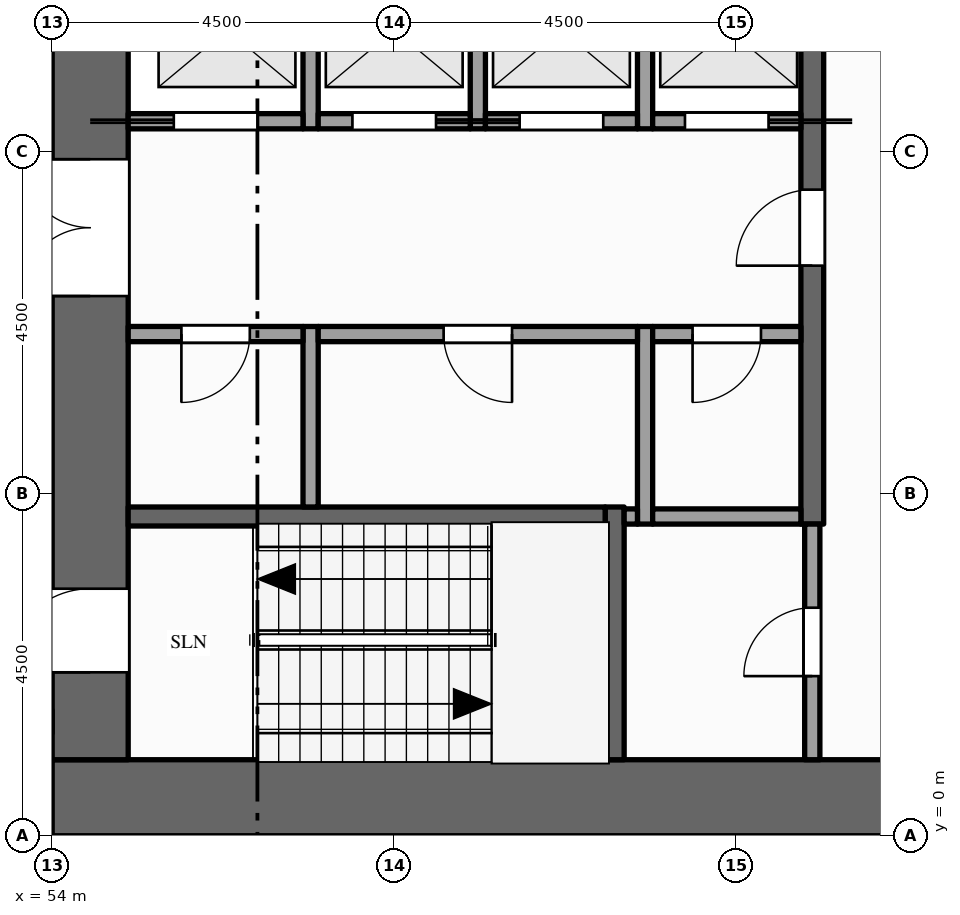
"""IFC4 building model, lengths in metres.
Left out: names, types, materials, properties, quantities, classifications, styles, units other than length and angle.
Written with IfcOpenShell. Run it as: python <this file> out.ifc"""

import sys

from ifc_helpers import new_model, si_unit, direction, frame, frame_2d, origin, place, context, subcontext, project, spatial, rectangle, extrude, element, fill, save


model = new_model("IFC4")
c1 = context("Model", 3, precision=1e-05, world=origin(), true_north=direction((0.0, 1.0)))
c2 = subcontext(c1, "Body", "Model", "MODEL_VIEW")
j1 = project(units=[si_unit("LENGTHUNIT", "METRE"), si_unit("PLANEANGLEUNIT", "RADIAN")], contexts=[c1])
p1 = place(None, origin())
s1 = spatial("IfcSite", under=j1, at=p1, CompositionType="ELEMENT")
p2 = place(p1, origin())
s2 = spatial("IfcBuilding", under=s1, at=p2, CompositionType="ELEMENT")
p3 = place(p2, frame((0.0, 0.0, 159.0)))
s3 = spatial("IfcBuildingStorey", under=s2, at=p3, CompositionType="ELEMENT", Elevation=159.0)
p4 = place(p3, frame((67.5, 0.5, -0.15), z_axis=(0.0, 0.0, 1.0), x_axis=(-1.0, 0.0, 0.0)))
e1 = element("IfcWall", 1, at=p4, inside=s3, PredefinedType="SHEAR", context=c2, shape_type="SweptSolid", body=[
    extrude(rectangle(XDim=13.5, YDim=1.0, at=frame_2d((6.75, 0.0))), origin(), (0.0, 0.0, 1.0), 4.0),
])
p5 = place(p3, frame((54.5, 1.0, -0.15), z_axis=(0.0, 0.0, 1.0), x_axis=(0.0, 1.0, 0.0)))
e2 = element("IfcWall", 2, at=p5, inside=s3, PredefinedType="SHEAR", context=c2, shape_type="SweptSolid", body=[
    extrude(rectangle(XDim=20.5, YDim=1.0, at=frame_2d((10.25, 0.0))), origin(), (0.0, 0.0, 1.0), 4.0),
])
p6 = place(p5, frame((6.1, 0.0, 0.15)))
e3 = element("IfcOpeningElement", 3, at=p6, cuts=e2, PredefinedType="OPENING", context=c2, shape_type="SweptSolid", body=[
    extrude(rectangle(XDim=1.8, YDim=2.1, at=frame_2d((0.9, 1.05))), frame((0.0, 0.51, 0.0), z_axis=(0.0, -1.0, 0.0), x_axis=(1.0, 0.0, 0.0)), (0.0, 0.0, 1.0), 1.02),
])
p7 = place(p5, frame((12.15, 0.0, 0.15)))
e4 = element("IfcOpeningElement", 4, at=p7, cuts=e2, PredefinedType="OPENING", context=c2, shape_type="SweptSolid", body=[
    extrude(rectangle(XDim=1.1, YDim=2.1, at=frame_2d((0.55, 1.05))), frame((0.0, 0.51, 0.0), z_axis=(0.0, -1.0, 0.0), x_axis=(1.0, 0.0, 0.0)), (0.0, 0.0, 1.0), 1.02),
])
p8 = place(p5, frame((1.15, 0.0, 0.15)))
e5 = element("IfcOpeningElement", 5, at=p8, cuts=e2, PredefinedType="OPENING", context=c2, shape_type="SweptSolid", body=[
    extrude(rectangle(XDim=1.1, YDim=2.1, at=frame_2d((0.55, 1.05))), frame((0.0, 0.51, 0.0), z_axis=(0.0, -1.0, 0.0), x_axis=(1.0, 0.0, 0.0)), (0.0, 0.0, 1.0), 1.02),
])
p9 = place(p5, frame((18.35, 0.0, 0.15)))
e6 = element("IfcOpeningElement", 6, at=p9, cuts=e2, PredefinedType="OPENING", context=c2, shape_type="SweptSolid", body=[
    extrude(rectangle(XDim=1.1, YDim=2.1, at=frame_2d((0.55, 1.05))), frame((0.0, 0.51, 0.0), z_axis=(0.0, -1.0, 0.0), x_axis=(1.0, 0.0, 0.0)), (0.0, 0.0, 1.0), 1.02),
])
p10 = place(p3, frame((57.4, 4.325, 0.0), z_axis=(0.0, 0.0, 1.0), x_axis=(0.0, 1.0, 0.0)))
e7 = element("IfcWall", 7, at=p10, inside=s3, PredefinedType="PARTITIONING", context=c2, shape_type="SweptSolid", body=[
    extrude(rectangle(XDim=2.375, YDim=0.2, at=frame_2d((1.188, 0.0))), origin(), (0.0, 0.0, 1.0), 3.85),
])
for number, where, z_axis, x_axis in (
    (8, (57.4, 9.3, 0.0), (0.0, 0.0, 1.0), (0.0, 1.0, 0.0)),
    (9, (59.6, 9.3, 0.0), (0.0, 0.0, 1.0), (0.0, 1.0, 0.0)),
):
    element("IfcWall", number, at=place(p3, frame(where, z_axis=z_axis, x_axis=x_axis)), inside=s3, PredefinedType="SOLIDWALL", context=c2, shape_type="SweptSolid", body=[
        extrude(rectangle(XDim=2.6, YDim=0.2, at=frame_2d((1.3, 0.0))), origin(), (0.0, 0.0, 1.0), 3.85),
    ])
p11 = place(p3, frame((61.4, 1.0, 0.0), z_axis=(0.0, 0.0, 1.0), x_axis=(0.0, 1.0, 0.0)))
e10 = element("IfcWall", 10, at=p11, inside=s3, PredefinedType="SHEAR", context=c2, shape_type="SweptSolid", body=[
    extrude(rectangle(XDim=3.325, YDim=0.25, at=frame_2d((1.663, 0.0))), origin(), (0.0, 0.0, 1.0), 3.85),
])
p12 = place(p3, frame((61.8, 4.1, 0.0), z_axis=(0.0, 0.0, 1.0), x_axis=(0.0, 1.0, 0.0)))
e11 = element("IfcWall", 11, at=p12, inside=s3, PredefinedType="PARTITIONING", context=c2, shape_type="SweptSolid", body=[
    extrude(rectangle(XDim=2.6, YDim=0.2, at=frame_2d((1.3, 0.0))), origin(), (0.0, 0.0, 1.0), 3.85),
])
p13 = place(p3, frame((61.8, 9.3, 0.0), z_axis=(0.0, 0.0, 1.0), x_axis=(0.0, 1.0, 0.0)))
e12 = element("IfcWall", 12, at=p13, inside=s3, PredefinedType="SOLIDWALL", context=c2, shape_type="SweptSolid", body=[
    extrude(rectangle(XDim=2.6, YDim=0.2, at=frame_2d((1.3, 0.0))), origin(), (0.0, 0.0, 1.0), 3.85),
])
p14 = place(p3, frame((64.0, 1.0, 0.0), z_axis=(0.0, 0.0, 1.0), x_axis=(0.0, 1.0, 0.0)))
e13 = element("IfcWall", 13, at=p14, inside=s3, PredefinedType="PARTITIONING", context=c2, shape_type="SweptSolid", body=[
    extrude(rectangle(XDim=3.1, YDim=0.2, at=frame_2d((1.55, 0.0))), origin(), (0.0, 0.0, 1.0), 3.85),
])
p15 = place(p14, frame((1.1, 0.0, 0.0)))
e14 = element("IfcOpeningElement", 14, at=p15, cuts=e13, PredefinedType="OPENING", context=c2, shape_type="SweptSolid", body=[
    extrude(rectangle(XDim=0.9, YDim=2.1, at=frame_2d((0.45, 1.05))), frame((0.0, 0.11, 0.0), z_axis=(0.0, -1.0, 0.0), x_axis=(1.0, 0.0, 0.0)), (0.0, 0.0, 1.0), 0.22),
])
p16 = place(p3, frame((64.0, 4.1, 0.0), z_axis=(0.0, 0.0, 1.0), x_axis=(0.0, 1.0, 0.0)))
e15 = element("IfcWall", 15, at=p16, inside=s3, PredefinedType="SHEAR", context=c2, shape_type="SweptSolid", body=[
    extrude(rectangle(XDim=14.5, YDim=0.3, at=frame_2d((7.25, 0.0))), origin(), (0.0, 0.0, 1.0), 3.85),
])
p17 = place(p16, frame((3.4, 0.0, 0.0)))
e16 = element("IfcOpeningElement", 16, at=p17, cuts=e15, PredefinedType="OPENING", context=c2, shape_type="SweptSolid", body=[
    extrude(rectangle(XDim=1.0, YDim=2.1, at=frame_2d((0.5, 1.05))), frame((0.0, 0.16, 0.0), z_axis=(0.0, -1.0, 0.0), x_axis=(1.0, 0.0, 0.0)), (0.0, 0.0, 1.0), 0.32),
])
p18 = place(p16, frame((9.1, 0.0, 0.0)))
e17 = element("IfcOpeningElement", 17, at=p18, cuts=e15, PredefinedType="OPENING", context=c2, shape_type="SweptSolid", body=[
    extrude(rectangle(XDim=1.0, YDim=2.1, at=frame_2d((0.5, 1.05))), frame((0.0, 0.16, 0.0), z_axis=(0.0, -1.0, 0.0), x_axis=(1.0, 0.0, 0.0)), (0.0, 0.0, 1.0), 0.32),
])
p19 = place(p3, frame((55.0, 4.2, 0.0), z_axis=(0.0, 0.0, 1.0), x_axis=(1.0, 0.0, 0.0)))
e18 = element("IfcWall", 18, at=p19, inside=s3, PredefinedType="SHEAR", context=c2, shape_type="SweptSolid", body=[
    extrude(rectangle(XDim=6.275, YDim=0.25, at=frame_2d((3.137, 0.0))), origin(), (0.0, 0.0, 1.0), 3.85),
])
p20 = place(p3, frame((61.525, 4.2, 0.0), z_axis=(0.0, 0.0, 1.0), x_axis=(1.0, 0.0, 0.0)))
e19 = element("IfcWall", 19, at=p20, inside=s3, PredefinedType="PARTITIONING", context=c2, shape_type="SweptSolid", body=[
    extrude(rectangle(XDim=0.175, YDim=0.2, at=frame_2d((0.087, 0.0))), origin(), (0.0, 0.0, 1.0), 3.85),
])
p21 = place(p3, frame((61.9, 4.2, 0.0), z_axis=(0.0, 0.0, 1.0), x_axis=(1.0, 0.0, 0.0)))
e20 = element("IfcWall", 20, at=p21, inside=s3, PredefinedType="PARTITIONING", context=c2, shape_type="SweptSolid", body=[
    extrude(rectangle(XDim=1.95, YDim=0.2, at=frame_2d((0.975, 0.0))), origin(), (0.0, 0.0, 1.0), 3.85),
])
p22 = place(p3, frame((55.0, 6.6, 0.0), z_axis=(0.0, 0.0, 1.0), x_axis=(1.0, 0.0, 0.0)))
e21 = element("IfcWall", 21, at=p22, inside=s3, PredefinedType="PARTITIONING", context=c2, shape_type="SweptSolid", body=[
    extrude(rectangle(XDim=2.3, YDim=0.2, at=frame_2d((1.15, 0.0))), origin(), (0.0, 0.0, 1.0), 3.85),
])
p23 = place(p22, frame((0.7, 0.0, 0.0)))
e22 = element("IfcOpeningElement", 22, at=p23, cuts=e21, PredefinedType="OPENING", context=c2, shape_type="SweptSolid", body=[
    extrude(rectangle(XDim=0.9, YDim=2.1, at=frame_2d((0.45, 1.05))), frame((0.0, 0.11, 0.0), z_axis=(0.0, -1.0, 0.0), x_axis=(1.0, 0.0, 0.0)), (0.0, 0.0, 1.0), 0.22),
])
p24 = place(p3, frame((57.5, 6.6, 0.0), z_axis=(0.0, 0.0, 1.0), x_axis=(1.0, 0.0, 0.0)))
e23 = element("IfcWall", 23, at=p24, inside=s3, PredefinedType="PARTITIONING", context=c2, shape_type="SweptSolid", body=[
    extrude(rectangle(XDim=4.2, YDim=0.2, at=frame_2d((2.1, 0.0))), origin(), (0.0, 0.0, 1.0), 3.85),
])
p25 = place(p24, frame((1.65, 0.0, 0.0)))
e24 = element("IfcOpeningElement", 24, at=p25, cuts=e23, PredefinedType="OPENING", context=c2, shape_type="SweptSolid", body=[
    extrude(rectangle(XDim=0.9, YDim=2.1, at=frame_2d((0.45, 1.05))), frame((0.0, 0.11, 0.0), z_axis=(0.0, -1.0, 0.0), x_axis=(1.0, 0.0, 0.0)), (0.0, 0.0, 1.0), 0.22),
])
p26 = place(p3, frame((61.9, 6.6, 0.0), z_axis=(0.0, 0.0, 1.0), x_axis=(1.0, 0.0, 0.0)))
e25 = element("IfcWall", 25, at=p26, inside=s3, PredefinedType="PARTITIONING", context=c2, shape_type="SweptSolid", body=[
    extrude(rectangle(XDim=1.95, YDim=0.2, at=frame_2d((0.975, 0.0))), origin(), (0.0, 0.0, 1.0), 3.85),
])
p27 = place(p26, frame((0.525, 0.0, 0.0)))
e26 = element("IfcOpeningElement", 26, at=p27, cuts=e25, PredefinedType="OPENING", context=c2, shape_type="SweptSolid", body=[
    extrude(rectangle(XDim=0.9, YDim=2.1, at=frame_2d((0.45, 1.05))), frame((0.0, 0.11, 0.0), z_axis=(0.0, -1.0, 0.0), x_axis=(1.0, 0.0, 0.0)), (0.0, 0.0, 1.0), 0.22),
])
p28 = place(p3, frame((55.0, 9.4, 0.0), z_axis=(0.0, 0.0, 1.0), x_axis=(1.0, 0.0, 0.0)))
e27 = element("IfcWall", 27, at=p28, inside=s3, PredefinedType="SOLIDWALL", context=c2, shape_type="SweptSolid", body=[
    extrude(rectangle(XDim=2.3, YDim=0.2, at=frame_2d((1.15, 0.0))), origin(), (0.0, 0.0, 1.0), 3.85),
])
p29 = place(p28, frame((0.6, 0.0, 0.012)))
e28 = element("IfcOpeningElement", 28, at=p29, cuts=e27, PredefinedType="OPENING", context=c2, shape_type="SweptSolid", body=[
    extrude(rectangle(XDim=1.1, YDim=2.1, at=frame_2d((0.55, 1.05))), frame((0.0, 0.11, 0.0), z_axis=(0.0, -1.0, 0.0), x_axis=(1.0, 0.0, 0.0)), (0.0, 0.0, 1.0), 0.22),
])
p30 = place(p3, frame((57.5, 9.4, 0.0), z_axis=(0.0, 0.0, 1.0), x_axis=(1.0, 0.0, 0.0)))
e29 = element("IfcWall", 29, at=p30, inside=s3, PredefinedType="SOLIDWALL", context=c2, shape_type="SweptSolid", body=[
    extrude(rectangle(XDim=2.0, YDim=0.2, at=frame_2d((1.0, 0.0))), origin(), (0.0, 0.0, 1.0), 3.85),
])
p31 = place(p30, frame((0.45, 0.0, 0.012)))
e30 = element("IfcOpeningElement", 30, at=p31, cuts=e29, PredefinedType="OPENING", context=c2, shape_type="SweptSolid", body=[
    extrude(rectangle(XDim=1.1, YDim=2.1, at=frame_2d((0.55, 1.05))), frame((0.0, 0.11, 0.0), z_axis=(0.0, -1.0, 0.0), x_axis=(1.0, 0.0, 0.0)), (0.0, 0.0, 1.0), 0.22),
])
p32 = place(p3, frame((59.7, 9.4, 0.0), z_axis=(0.0, 0.0, 1.0), x_axis=(1.0, 0.0, 0.0)))
e31 = element("IfcWall", 31, at=p32, inside=s3, PredefinedType="SOLIDWALL", context=c2, shape_type="SweptSolid", body=[
    extrude(rectangle(XDim=2.0, YDim=0.2, at=frame_2d((1.0, 0.0))), origin(), (0.0, 0.0, 1.0), 3.85),
])
p33 = place(p32, frame((0.45, 0.0, 0.012)))
e32 = element("IfcOpeningElement", 32, at=p33, cuts=e31, PredefinedType="OPENING", context=c2, shape_type="SweptSolid", body=[
    extrude(rectangle(XDim=1.1, YDim=2.1, at=frame_2d((0.55, 1.05))), frame((0.0, 0.11, 0.0), z_axis=(0.0, -1.0, 0.0), x_axis=(1.0, 0.0, 0.0)), (0.0, 0.0, 1.0), 0.22),
])
p34 = place(p3, frame((61.9, 9.4, 0.0), z_axis=(0.0, 0.0, 1.0), x_axis=(1.0, 0.0, 0.0)))
e33 = element("IfcWall", 33, at=p34, inside=s3, PredefinedType="SOLIDWALL", context=c2, shape_type="SweptSolid", body=[
    extrude(rectangle(XDim=1.95, YDim=0.2, at=frame_2d((0.975, 0.0))), origin(), (0.0, 0.0, 1.0), 3.85),
])
p35 = place(p34, frame((0.425, 0.0, 0.012)))
e34 = element("IfcOpeningElement", 34, at=p35, cuts=e33, PredefinedType="OPENING", context=c2, shape_type="SweptSolid", body=[
    extrude(rectangle(XDim=1.1, YDim=2.1, at=frame_2d((0.55, 1.05))), frame((0.0, 0.11, 0.0), z_axis=(0.0, -1.0, 0.0), x_axis=(1.0, 0.0, 0.0)), (0.0, 0.0, 1.0), 0.22),
])
p36 = place(p29, origin())
e35 = element("IfcDoor", 35, at=p36, inside=s3, OperationType="SLIDING_TO_LEFT", PredefinedType="DOOR", context=c2, shape_type="SweptSolid", body=[
    extrude(rectangle(XDim=1.1, YDim=2.1, at=frame_2d((0.55, 1.05))), frame((0.0, 0.025, 0.0), z_axis=(0.0, -1.0, 0.0), x_axis=(1.0, 0.0, 0.0)), (0.0, 0.0, 1.0), 0.05),
])
fill(e28, e35)
p37 = place(p31, origin())
e36 = element("IfcDoor", 36, at=p37, inside=s3, OperationType="SLIDING_TO_RIGHT", PredefinedType="DOOR", context=c2, shape_type="SweptSolid", body=[
    extrude(rectangle(XDim=1.1, YDim=2.1, at=frame_2d((0.55, 1.05))), frame((0.0, 0.025, 0.0), z_axis=(0.0, -1.0, 0.0), x_axis=(1.0, 0.0, 0.0)), (0.0, 0.0, 1.0), 0.05),
])
fill(e30, e36)
p38 = place(p33, origin())
e37 = element("IfcDoor", 37, at=p38, inside=s3, OperationType="SLIDING_TO_LEFT", PredefinedType="DOOR", context=c2, shape_type="SweptSolid", body=[
    extrude(rectangle(XDim=1.1, YDim=2.1, at=frame_2d((0.55, 1.05))), frame((0.0, 0.025, 0.0), z_axis=(0.0, -1.0, 0.0), x_axis=(1.0, 0.0, 0.0)), (0.0, 0.0, 1.0), 0.05),
])
fill(e32, e37)
p39 = place(p35, origin())
e38 = element("IfcDoor", 38, at=p39, inside=s3, OperationType="SLIDING_TO_RIGHT", PredefinedType="DOOR", context=c2, shape_type="SweptSolid", body=[
    extrude(rectangle(XDim=1.1, YDim=2.1, at=frame_2d((0.55, 1.05))), frame((0.0, 0.025, 0.0), z_axis=(0.0, -1.0, 0.0), x_axis=(1.0, 0.0, 0.0)), (0.0, 0.0, 1.0), 0.05),
])
fill(e34, e38)
p40 = place(p6, origin())
e39 = element("IfcDoor", 39, at=p40, inside=s3, OperationType="DOUBLE_DOOR_SINGLE_SWING", PredefinedType="DOOR", context=c2, shape_type="SweptSolid", body=[
    extrude(rectangle(XDim=1.8, YDim=2.1, at=frame_2d((0.9, 1.05))), frame((0.0, 0.025, 0.0), z_axis=(0.0, -1.0, 0.0), x_axis=(1.0, 0.0, 0.0)), (0.0, 0.0, 1.0), 0.05),
])
fill(e3, e39)
p41 = place(p17, origin())
e40 = element("IfcDoor", 40, at=p41, inside=s3, OperationType="SINGLE_SWING_LEFT", PredefinedType="DOOR", context=c2, shape_type="SweptSolid", body=[
    extrude(rectangle(XDim=1.0, YDim=2.1, at=frame_2d((0.5, 1.05))), frame((0.0, 0.025, 0.0), z_axis=(0.0, -1.0, 0.0), x_axis=(1.0, 0.0, 0.0)), (0.0, 0.0, 1.0), 0.05),
])
fill(e16, e40)
p42 = place(p8, origin())
e41 = element("IfcDoor", 41, at=p42, inside=s3, OperationType="SINGLE_SWING_LEFT", PredefinedType="DOOR", context=c2, shape_type="SweptSolid", body=[
    extrude(rectangle(XDim=1.1, YDim=2.1, at=frame_2d((0.55, 1.05))), frame((0.0, 0.025, 0.0), z_axis=(0.0, -1.0, 0.0), x_axis=(1.0, 0.0, 0.0)), (0.0, 0.0, 1.0), 0.05),
])
fill(e5, e41)
p43 = place(p15, origin())
e42 = element("IfcDoor", 42, at=p43, inside=s3, OperationType="SINGLE_SWING_LEFT", PredefinedType="DOOR", context=c2, shape_type="SweptSolid", body=[
    extrude(rectangle(XDim=0.9, YDim=2.1, at=frame_2d((0.45, 1.05))), frame((0.0, 0.025, 0.0), z_axis=(0.0, -1.0, 0.0), x_axis=(1.0, 0.0, 0.0)), (0.0, 0.0, 1.0), 0.05),
])
fill(e14, e42)
p44 = place(p23, origin())
e43 = element("IfcDoor", 43, at=p44, inside=s3, OperationType="SINGLE_SWING_LEFT", PredefinedType="DOOR", context=c2, shape_type="SweptSolid", body=[
    extrude(rectangle(XDim=0.9, YDim=2.1, at=frame_2d((0.45, 1.05))), frame((0.0, 0.025, 0.0), z_axis=(0.0, -1.0, 0.0), x_axis=(1.0, 0.0, 0.0)), (0.0, 0.0, 1.0), 0.05),
])
fill(e22, e43)
p45 = place(p25, origin())
e44 = element("IfcDoor", 44, at=p45, inside=s3, OperationType="SINGLE_SWING_RIGHT", PredefinedType="DOOR", context=c2, shape_type="SweptSolid", body=[
    extrude(rectangle(XDim=0.9, YDim=2.1, at=frame_2d((0.45, 1.05))), frame((0.0, 0.025, 0.0), z_axis=(0.0, -1.0, 0.0), x_axis=(1.0, 0.0, 0.0)), (0.0, 0.0, 1.0), 0.05),
])
fill(e24, e44)
p46 = place(p27, origin())
e45 = element("IfcDoor", 45, at=p46, inside=s3, OperationType="SINGLE_SWING_LEFT", PredefinedType="DOOR", context=c2, shape_type="SweptSolid", body=[
    extrude(rectangle(XDim=0.9, YDim=2.1, at=frame_2d((0.45, 1.05))), frame((0.0, 0.025, 0.0), z_axis=(0.0, -1.0, 0.0), x_axis=(1.0, 0.0, 0.0)), (0.0, 0.0, 1.0), 0.05),
])
fill(e26, e45)
save(model, sys.argv[1])
